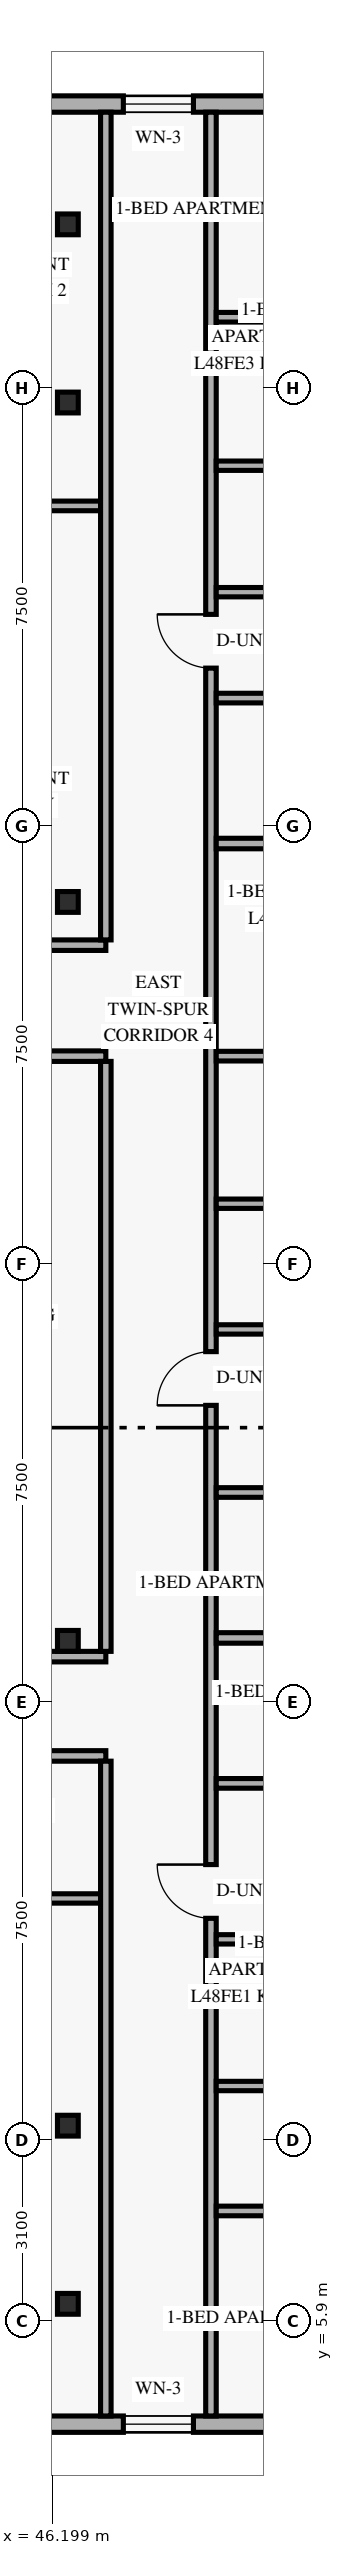
"""IFC4 building model, lengths in metres.
Left out: names, types, materials, properties, quantities, classifications, styles, units other than length and angle.
Written with IfcOpenShell. Run it as: python <this file> out.ifc"""

import sys

from ifc_helpers import new_model, si_unit, direction, frame, frame_2d, origin, origin_2d, place, context, subcontext, project, spatial, rectangle, hollow_rectangle, extrude, element, fill, save


model = new_model("IFC4")
c1 = context("Model", 3, precision=1e-05, world=origin(), true_north=direction((0.0, 1.0)))
c2 = subcontext(c1, "Body", "Model", "MODEL_VIEW")
j1 = project(units=[si_unit("LENGTHUNIT", "METRE"), si_unit("PLANEANGLEUNIT", "RADIAN")], contexts=[c1])
p1 = place(None, origin())
s1 = spatial("IfcSite", under=j1, at=p1, CompositionType="ELEMENT")
p2 = place(p1, origin())
s2 = spatial("IfcBuilding", under=s1, at=p2, CompositionType="ELEMENT")
p3 = place(p2, frame((0.0, 0.0, 184.8)))
s3 = spatial("IfcBuildingStorey", under=s2, at=p3, CompositionType="ELEMENT", Elevation=184.8)
for number, where, z_axis, x_axis in (
    (1, (46.404, 6.2, 0.0), (0.035, 0.0, 0.999), (0.0, 1.0, 0.0)),
    (2, (46.404, 9.25, 0.0), (0.035, 0.0, 0.999), (0.0, 1.0, 0.0)),
    (3, (46.404, 17.55, 0.0), (0.035, 0.0, 0.999), (0.0, 1.0, 0.0)),
    (4, (46.404, 30.2, 0.0), (0.035, 0.0, 0.999), (0.0, 1.0, 0.0)),
    (5, (46.404, 38.75, 0.0), (0.035, 0.0, 0.999), (0.0, 1.0, 0.0)),
    (6, (46.404, 41.8, 0.0), (0.035, 0.0, 0.999), (0.0, 1.0, 0.0)),
):
    element("IfcColumn", number, at=place(p3, frame(where, z_axis=z_axis, x_axis=x_axis)), inside=s3, PredefinedType="COLUMN", context=c2, shape_type="SweptSolid", body=[
        extrude(hollow_rectangle(XDim=0.356, YDim=0.356, WallThickness=0.016, at=origin_2d()), origin(), (0.0, 0.0, 1.0), 3.602),
    ])
p4 = place(p3, frame((21.22, 4.14, 0.0), z_axis=(0.0, 0.0, 1.0), x_axis=(1.0, 0.0, 0.0)))
e7 = element("IfcWall", 7, at=p4, inside=s3, PredefinedType="SOLIDWALL", context=c2, shape_type="SweptSolid", body=[
    extrude(rectangle(XDim=33.76, YDim=0.28, at=frame_2d((16.88, 0.0))), origin(), (0.0, 0.0, 1.0), 3.36),
])
p5 = place(p4, frame((2.33, 0.0, 0.85)))
e8 = element("IfcOpeningElement", 8, at=p5, cuts=e7, PredefinedType="OPENING", context=c2, shape_type="SweptSolid", body=[
    extrude(rectangle(XDim=1.65, YDim=1.6, at=frame_2d((0.825, 0.8))), frame((0.0, 0.15, 0.0), z_axis=(0.0, -1.0, 0.0), x_axis=(1.0, 0.0, 0.0)), (0.0, 0.0, 1.0), 0.3),
])
p6 = place(p4, frame((9.215, 0.0, 0.85)))
e9 = element("IfcOpeningElement", 9, at=p6, cuts=e7, PredefinedType="OPENING", context=c2, shape_type="SweptSolid", body=[
    extrude(rectangle(XDim=1.65, YDim=1.6, at=frame_2d((0.825, 0.8))), frame((0.0, 0.15, 0.0), z_axis=(0.0, -1.0, 0.0), x_axis=(1.0, 0.0, 0.0)), (0.0, 0.0, 1.0), 0.3),
])
p7 = place(p4, frame((14.64, 0.0, 0.85)))
e10 = element("IfcOpeningElement", 10, at=p7, cuts=e7, PredefinedType="OPENING", context=c2, shape_type="SweptSolid", body=[
    extrude(rectangle(XDim=1.65, YDim=1.6, at=frame_2d((0.825, 0.8))), frame((0.0, 0.15, 0.0), z_axis=(0.0, -1.0, 0.0), x_axis=(1.0, 0.0, 0.0)), (0.0, 0.0, 1.0), 0.3),
])
p8 = place(p4, frame((20.489, 0.0, 0.85)))
e11 = element("IfcOpeningElement", 11, at=p8, cuts=e7, PredefinedType="OPENING", context=c2, shape_type="SweptSolid", body=[
    extrude(rectangle(XDim=1.65, YDim=1.6, at=frame_2d((0.825, 0.8))), frame((0.0, 0.15, 0.0), z_axis=(0.0, -1.0, 0.0), x_axis=(1.0, 0.0, 0.0)), (0.0, 0.0, 1.0), 0.3),
])
p9 = place(p4, frame((26.197, 0.0, 0.85)))
e12 = element("IfcOpeningElement", 12, at=p9, cuts=e7, PredefinedType="OPENING", context=c2, shape_type="SweptSolid", body=[
    extrude(rectangle(XDim=1.2, YDim=1.5, at=frame_2d((0.6, 0.75))), frame((0.0, 0.15, 0.0), z_axis=(0.0, -1.0, 0.0), x_axis=(1.0, 0.0, 0.0)), (0.0, 0.0, 1.0), 0.3),
])
p10 = place(p4, frame((29.904, 0.0, 0.85)))
e13 = element("IfcOpeningElement", 13, at=p10, cuts=e7, PredefinedType="OPENING", context=c2, shape_type="SweptSolid", body=[
    extrude(rectangle(XDim=1.65, YDim=1.6, at=frame_2d((0.825, 0.8))), frame((0.0, 0.15, 0.0), z_axis=(0.0, -1.0, 0.0), x_axis=(1.0, 0.0, 0.0)), (0.0, 0.0, 1.0), 0.3),
])
p11 = place(p3, frame((54.98, 43.86, 0.0), z_axis=(0.0, 0.0, 1.0), x_axis=(-1.0, 0.0, 0.0)))
e14 = element("IfcWall", 14, at=p11, inside=s3, PredefinedType="SOLIDWALL", context=c2, shape_type="SweptSolid", body=[
    extrude(rectangle(XDim=33.76, YDim=0.28, at=frame_2d((16.88, 0.0))), origin(), (0.0, 0.0, 1.0), 3.36),
])
p12 = place(p11, frame((28.555, 0.0, 0.85)))
e15 = element("IfcOpeningElement", 15, at=p12, cuts=e14, PredefinedType="OPENING", context=c2, shape_type="SweptSolid", body=[
    extrude(rectangle(XDim=1.65, YDim=1.6, at=frame_2d((0.825, 0.8))), frame((0.0, 0.15, 0.0), z_axis=(0.0, -1.0, 0.0), x_axis=(1.0, 0.0, 0.0)), (0.0, 0.0, 1.0), 0.3),
])
p13 = place(p11, frame((21.67, 0.0, 0.85)))
e16 = element("IfcOpeningElement", 16, at=p13, cuts=e14, PredefinedType="OPENING", context=c2, shape_type="SweptSolid", body=[
    extrude(rectangle(XDim=1.65, YDim=1.6, at=frame_2d((0.825, 0.8))), frame((0.0, 0.15, 0.0), z_axis=(0.0, -1.0, 0.0), x_axis=(1.0, 0.0, 0.0)), (0.0, 0.0, 1.0), 0.3),
])
p14 = place(p11, frame((14.957, 0.0, 0.85)))
e17 = element("IfcOpeningElement", 17, at=p14, cuts=e14, PredefinedType="OPENING", context=c2, shape_type="SweptSolid", body=[
    extrude(rectangle(XDim=1.65, YDim=1.6, at=frame_2d((0.825, 0.8))), frame((0.0, 0.15, 0.0), z_axis=(0.0, -1.0, 0.0), x_axis=(1.0, 0.0, 0.0)), (0.0, 0.0, 1.0), 0.3),
])
p15 = place(p11, frame((9.108, 0.0, 0.85)))
e18 = element("IfcOpeningElement", 18, at=p15, cuts=e14, PredefinedType="OPENING", context=c2, shape_type="SweptSolid", body=[
    extrude(rectangle(XDim=1.65, YDim=1.6, at=frame_2d((0.825, 0.8))), frame((0.0, 0.15, 0.0), z_axis=(0.0, -1.0, 0.0), x_axis=(1.0, 0.0, 0.0)), (0.0, 0.0, 1.0), 0.3),
])
p16 = place(p11, frame((6.363, 0.0, 0.85)))
e19 = element("IfcOpeningElement", 19, at=p16, cuts=e14, PredefinedType="OPENING", context=c2, shape_type="SweptSolid", body=[
    extrude(rectangle(XDim=1.2, YDim=1.5, at=frame_2d((0.6, 0.75))), frame((0.0, 0.15, 0.0), z_axis=(0.0, -1.0, 0.0), x_axis=(1.0, 0.0, 0.0)), (0.0, 0.0, 1.0), 0.3),
])
p17 = place(p11, frame((2.207, 0.0, 0.85)))
e20 = element("IfcOpeningElement", 20, at=p17, cuts=e14, PredefinedType="OPENING", context=c2, shape_type="SweptSolid", body=[
    extrude(rectangle(XDim=1.65, YDim=1.6, at=frame_2d((0.825, 0.8))), frame((0.0, 0.15, 0.0), z_axis=(0.0, -1.0, 0.0), x_axis=(1.0, 0.0, 0.0)), (0.0, 0.0, 1.0), 0.3),
])
p18 = place(p3, frame((38.032, 15.58, 0.0), z_axis=(0.0, 0.0, 1.0), x_axis=(1.0, 0.0, 0.0)))
e21 = element("IfcWall", 21, at=p18, inside=s3, PredefinedType="STANDARD", context=c2, shape_type="SweptSolid", body=[
    extrude(rectangle(XDim=9.084, YDim=0.18, at=frame_2d((4.542, 0.0))), origin(), (0.0, 0.0, 1.0), 2.73),
])
p19 = place(p18, frame((0.357, 0.0, 0.0)))
e22 = element("IfcOpeningElement", 22, at=p19, cuts=e21, PredefinedType="OPENING", context=c2, shape_type="SweptSolid", body=[
    extrude(rectangle(XDim=0.92, YDim=2.15, at=frame_2d((0.46, 1.075))), frame((0.0, 0.1, 0.0), z_axis=(0.0, -1.0, 0.0), x_axis=(1.0, 0.0, 0.0)), (0.0, 0.0, 1.0), 0.2),
])
p20 = place(p3, frame((37.64, 17.28, 0.0), z_axis=(0.0, 0.0, 1.0), x_axis=(1.0, 0.0, 0.0)))
e23 = element("IfcWall", 23, at=p20, inside=s3, PredefinedType="STANDARD", context=c2, shape_type="SweptSolid", body=[
    extrude(rectangle(XDim=9.477, YDim=0.18, at=frame_2d((4.739, 0.0))), origin(), (0.0, 0.0, 1.0), 2.73),
])
p21 = place(p20, frame((6.625, 0.0, 0.0)))
e24 = element("IfcOpeningElement", 24, at=p21, cuts=e23, PredefinedType="OPENING", context=c2, shape_type="SweptSolid", body=[
    extrude(rectangle(XDim=0.92, YDim=2.15, at=frame_2d((0.46, 1.075))), frame((0.0, 0.1, 0.0), z_axis=(0.0, -1.0, 0.0), x_axis=(1.0, 0.0, 0.0)), (0.0, 0.0, 1.0), 0.2),
])
p22 = place(p3, frame((37.64, 27.56, 0.0), z_axis=(0.0, 0.0, 1.0), x_axis=(1.0, 0.0, 0.0)))
e25 = element("IfcWall", 25, at=p22, inside=s3, PredefinedType="STANDARD", context=c2, shape_type="SweptSolid", body=[
    extrude(rectangle(XDim=9.477, YDim=0.18, at=frame_2d((4.739, 0.0))), origin(), (0.0, 0.0, 1.0), 2.73),
])
p23 = place(p3, frame((35.51, 29.46, 0.0), z_axis=(0.0, 0.0, 1.0), x_axis=(1.0, 0.0, 0.0)))
e26 = element("IfcWall", 26, at=p23, inside=s3, PredefinedType="STANDARD", context=c2, shape_type="SweptSolid", body=[
    extrude(rectangle(XDim=11.607, YDim=0.18, at=frame_2d((5.803, 0.0))), origin(), (0.0, 0.0, 1.0), 2.73),
])
p24 = place(p23, frame((0.32, 0.0, 0.0)))
e27 = element("IfcOpeningElement", 27, at=p24, cuts=e26, PredefinedType="OPENING", context=c2, shape_type="SweptSolid", body=[
    extrude(rectangle(XDim=0.92, YDim=2.15, at=frame_2d((0.46, 1.075))), frame((0.0, 0.1, 0.0), z_axis=(0.0, -1.0, 0.0), x_axis=(1.0, 0.0, 0.0)), (0.0, 0.0, 1.0), 0.2),
])
p25 = place(p3, frame((42.447, 13.14, 0.0), z_axis=(0.0, 0.0, 1.0), x_axis=(1.0, 0.0, 0.0)))
e28 = element("IfcWall", 28, at=p25, inside=s3, PredefinedType="PLUMBINGWALL", context=c2, shape_type="SweptSolid", body=[
    extrude(rectangle(XDim=4.67, YDim=0.16, at=frame_2d((2.335, 0.0))), origin(), (0.0, 0.0, 1.0), 2.73),
])
p26 = place(p25, frame((0.35, 0.0, 0.0)))
e29 = element("IfcOpeningElement", 29, at=p26, cuts=e28, PredefinedType="OPENING", context=c2, shape_type="SweptSolid", body=[
    extrude(rectangle(XDim=0.88, YDim=2.12, at=frame_2d((0.44, 1.06))), frame((0.0, 0.09, 0.0), z_axis=(0.0, -1.0, 0.0), x_axis=(1.0, 0.0, 0.0)), (0.0, 0.0, 1.0), 0.18),
])
p27 = place(p25, frame((2.72, 0.0, 0.0)))
e30 = element("IfcOpeningElement", 30, at=p27, cuts=e28, PredefinedType="OPENING", context=c2, shape_type="SweptSolid", body=[
    extrude(rectangle(XDim=0.86, YDim=2.12, at=frame_2d((0.43, 1.06))), frame((0.0, 0.09, 0.0), z_axis=(0.0, -1.0, 0.0), x_axis=(1.0, 0.0, 0.0)), (0.0, 0.0, 1.0), 0.18),
])
p28 = place(p3, frame((43.057, 36.98, 0.0), z_axis=(0.0, 0.0, 1.0), x_axis=(1.0, 0.0, 0.0)))
e31 = element("IfcWall", 31, at=p28, inside=s3, PredefinedType="PARTITIONING", context=c2, shape_type="SweptSolid", body=[
    extrude(rectangle(XDim=3.97, YDim=0.165, at=frame_2d((1.985, 0.0))), origin(), (0.0, 0.0, 1.0), 2.73),
])
p29 = place(p3, frame((48.917, 4.28, 0.0), z_axis=(0.0, 0.0, 1.0), x_axis=(0.0, 1.0, 0.0)))
e32 = element("IfcWall", 32, at=p29, inside=s3, PredefinedType="STANDARD", context=c2, shape_type="SweptSolid", body=[
    extrude(rectangle(XDim=39.44, YDim=0.18, at=frame_2d((19.72, 0.0))), origin(), (0.0, 0.0, 1.0), 2.73),
])
p30 = place(p29, frame((8.52, 0.0, 0.0)))
e33 = element("IfcOpeningElement", 33, at=p30, cuts=e32, PredefinedType="OPENING", context=c2, shape_type="SweptSolid", body=[
    extrude(rectangle(XDim=0.92, YDim=2.15, at=frame_2d((0.46, 1.075))), frame((0.0, 0.1, 0.0), z_axis=(0.0, -1.0, 0.0), x_axis=(1.0, 0.0, 0.0)), (0.0, 0.0, 1.0), 0.2),
])
p31 = place(p29, frame((17.302, 0.0, 0.0)))
e34 = element("IfcOpeningElement", 34, at=p31, cuts=e32, PredefinedType="OPENING", context=c2, shape_type="SweptSolid", body=[
    extrude(rectangle(XDim=0.92, YDim=2.15, at=frame_2d((0.46, 1.075))), frame((0.0, 0.1, 0.0), z_axis=(0.0, -1.0, 0.0), x_axis=(1.0, 0.0, 0.0)), (0.0, 0.0, 1.0), 0.2),
])
p32 = place(p29, frame((29.923, 0.0, 0.0)))
e35 = element("IfcOpeningElement", 35, at=p32, cuts=e32, PredefinedType="OPENING", context=c2, shape_type="SweptSolid", body=[
    extrude(rectangle(XDim=0.92, YDim=2.15, at=frame_2d((0.46, 1.075))), frame((0.0, 0.1, 0.0), z_axis=(0.0, -1.0, 0.0), x_axis=(1.0, 0.0, 0.0)), (0.0, 0.0, 1.0), 0.2),
])
p33 = place(p3, frame((47.117, 4.28, 0.0), z_axis=(0.0, 0.0, 1.0), x_axis=(0.0, 1.0, 0.0)))
e36 = element("IfcWall", 36, at=p33, inside=s3, PredefinedType="STANDARD", context=c2, shape_type="SweptSolid", body=[
    extrude(rectangle(XDim=11.21, YDim=0.18, at=frame_2d((5.605, 0.0))), origin(), (0.0, 0.0, 1.0), 2.73),
])
p34 = place(p3, frame((47.117, 17.37, 0.0), z_axis=(0.0, 0.0, 1.0), x_axis=(0.0, 1.0, 0.0)))
e37 = element("IfcWall", 37, at=p34, inside=s3, PredefinedType="STANDARD", context=c2, shape_type="SweptSolid", body=[
    extrude(rectangle(XDim=10.1, YDim=0.18, at=frame_2d((5.05, 0.0))), origin(), (0.0, 0.0, 1.0), 2.73),
])
p35 = place(p3, frame((47.117, 29.55, 0.0), z_axis=(0.0, 0.0, 1.0), x_axis=(0.0, 1.0, 0.0)))
e38 = element("IfcWall", 38, at=p35, inside=s3, PredefinedType="STANDARD", context=c2, shape_type="SweptSolid", body=[
    extrude(rectangle(XDim=14.17, YDim=0.18, at=frame_2d((7.085, 0.0))), origin(), (0.0, 0.0, 1.0), 2.73),
])
p36 = place(p3, frame((49.007, 7.79, 0.0), z_axis=(0.0, 0.0, 1.0), x_axis=(1.0, 0.0, 0.0)))
e39 = element("IfcWall", 39, at=p36, inside=s3, PredefinedType="PARTITIONING", context=c2, shape_type="SweptSolid", body=[
    extrude(rectangle(XDim=9.313, YDim=0.165, at=frame_2d((4.656, 0.0))), origin(), (0.0, 0.0, 1.0), 2.879),
])
p37 = place(p36, frame((5.602, 0.0, 0.0)))
e40 = element("IfcOpeningElement", 40, at=p37, cuts=e39, PredefinedType="OPENING", context=c2, shape_type="SweptSolid", body=[
    extrude(rectangle(XDim=0.9, YDim=2.14, at=frame_2d((0.45, 1.07))), frame((0.0, 0.093, 0.0), z_axis=(0.0, -1.0, 0.0), x_axis=(1.0, 0.0, 0.0)), (0.0, 0.0, 1.0), 0.185),
])
p38 = place(p3, frame((49.007, 12.44, 0.0), z_axis=(0.0, 0.0, 1.0), x_axis=(1.0, 0.0, 0.0)))
e41 = element("IfcWall", 41, at=p38, inside=s3, PredefinedType="PLUMBINGWALL", context=c2, shape_type="SweptSolid", body=[
    extrude(rectangle(XDim=2.56, YDim=0.16, at=frame_2d((1.28, 0.0))), origin(), (0.0, 0.0, 1.0), 3.36),
])
p39 = place(p3, frame((49.007, 9.929, 0.0), z_axis=(0.0, 0.0, 1.0), x_axis=(1.0, 0.0, 0.0)))
e42 = element("IfcWall", 42, at=p39, inside=s3, PredefinedType="PLUMBINGWALL", context=c2, shape_type="SweptSolid", body=[
    extrude(rectangle(XDim=2.4, YDim=0.16, at=frame_2d((1.2, 0.0))), origin(), (0.0, 0.0, 1.0), 3.36),
])
p40 = place(p3, frame((49.007, 15.11, 0.0), z_axis=(0.0, 0.0, 1.0), x_axis=(1.0, 0.0, 0.0)))
e43 = element("IfcWall", 43, at=p40, inside=s3, PredefinedType="PARTITIONING", context=c2, shape_type="SweptSolid", body=[
    extrude(rectangle(XDim=9.313, YDim=0.165, at=frame_2d((4.656, 0.0))), origin(), (0.0, 0.0, 1.0), 2.879),
])
p41 = place(p40, frame((4.632, 0.0, 0.0)))
e44 = element("IfcOpeningElement", 44, at=p41, cuts=e43, PredefinedType="OPENING", context=c2, shape_type="SweptSolid", body=[
    extrude(rectangle(XDim=0.95, YDim=2.15, at=frame_2d((0.475, 1.075))), frame((0.0, 0.093, 0.0), z_axis=(0.0, -1.0, 0.0), x_axis=(1.0, 0.0, 0.0)), (0.0, 0.0, 1.0), 0.185),
])
p42 = place(p3, frame((49.007, 17.6, 0.0), z_axis=(0.0, 0.0, 1.0), x_axis=(1.0, 0.0, 0.0)))
e45 = element("IfcWall", 45, at=p42, inside=s3, PredefinedType="PARTITIONING", context=c2, shape_type="SweptSolid", body=[
    extrude(rectangle(XDim=9.313, YDim=0.18, at=frame_2d((4.656, 0.0))), origin(), (0.0, 0.0, 1.0), 2.73),
])
p43 = place(p3, frame((49.007, 27.56, 0.0), z_axis=(0.0, 0.0, 1.0), x_axis=(1.0, 0.0, 0.0)))
e46 = element("IfcWall", 46, at=p43, inside=s3, PredefinedType="PARTITIONING", context=c2, shape_type="SweptSolid", body=[
    extrude(rectangle(XDim=9.313, YDim=0.165, at=frame_2d((4.656, 0.0))), origin(), (0.0, 0.0, 1.0), 2.879),
])
p44 = place(p43, frame((3.008, 0.0, 0.0)))
e47 = element("IfcOpeningElement", 47, at=p44, cuts=e46, PredefinedType="OPENING", context=c2, shape_type="SweptSolid", body=[
    extrude(rectangle(XDim=0.88, YDim=2.12, at=frame_2d((0.44, 1.06))), frame((0.0, 0.093, 0.0), z_axis=(0.0, -1.0, 0.0), x_axis=(1.0, 0.0, 0.0)), (0.0, 0.0, 1.0), 0.185),
])
p45 = place(p43, frame((6.441, 0.0, 0.0)))
e48 = element("IfcOpeningElement", 48, at=p45, cuts=e46, PredefinedType="OPENING", context=c2, shape_type="SweptSolid", body=[
    extrude(rectangle(XDim=0.9, YDim=2.14, at=frame_2d((0.45, 1.07))), frame((0.0, 0.093, 0.0), z_axis=(0.0, -1.0, 0.0), x_axis=(1.0, 0.0, 0.0)), (0.0, 0.0, 1.0), 0.185),
])
p46 = place(p3, frame((49.007, 22.882, 0.0), z_axis=(0.0, 0.0, 1.0), x_axis=(1.0, 0.0, 0.0)))
e49 = element("IfcWall", 49, at=p46, inside=s3, PredefinedType="PLUMBINGWALL", context=c2, shape_type="SweptSolid", body=[
    extrude(rectangle(XDim=2.636, YDim=0.16, at=frame_2d((1.318, 0.0))), origin(), (0.0, 0.0, 1.0), 3.36),
])
p47 = place(p3, frame((49.007, 25.034, 0.0), z_axis=(0.0, 0.0, 1.0), x_axis=(1.0, 0.0, 0.0)))
e50 = element("IfcWall", 50, at=p47, inside=s3, PredefinedType="PLUMBINGWALL", context=c2, shape_type="SweptSolid", body=[
    extrude(rectangle(XDim=2.476, YDim=0.16, at=frame_2d((1.238, 0.0))), origin(), (0.0, 0.0, 1.0), 3.36),
])
p48 = place(p3, frame((49.007, 20.09, 0.0), z_axis=(0.0, 0.0, 1.0), x_axis=(1.0, 0.0, 0.0)))
e51 = element("IfcWall", 51, at=p48, inside=s3, PredefinedType="PARTITIONING", context=c2, shape_type="SweptSolid", body=[
    extrude(rectangle(XDim=9.313, YDim=0.165, at=frame_2d((4.656, 0.0))), origin(), (0.0, 0.0, 1.0), 2.879),
])
p49 = place(p48, frame((4.632, 0.0, 0.0)))
e52 = element("IfcOpeningElement", 52, at=p49, cuts=e51, PredefinedType="OPENING", context=c2, shape_type="SweptSolid", body=[
    extrude(rectangle(XDim=0.95, YDim=2.15, at=frame_2d((0.475, 1.075))), frame((0.0, 0.093, 0.0), z_axis=(0.0, -1.0, 0.0), x_axis=(1.0, 0.0, 0.0)), (0.0, 0.0, 1.0), 0.185),
])
p50 = place(p3, frame((49.007, 31.2, 0.0), z_axis=(0.0, 0.0, 1.0), x_axis=(1.0, 0.0, 0.0)))
e53 = element("IfcWall", 53, at=p50, inside=s3, PredefinedType="PARTITIONING", context=c2, shape_type="SweptSolid", body=[
    extrude(rectangle(XDim=9.313, YDim=0.18, at=frame_2d((4.656, 0.0))), origin(), (0.0, 0.0, 1.0), 2.879),
])
p51 = place(p3, frame((49.007, 40.21, 0.0), z_axis=(0.0, 0.0, 1.0), x_axis=(1.0, 0.0, 0.0)))
e54 = element("IfcWall", 54, at=p51, inside=s3, PredefinedType="PARTITIONING", context=c2, shape_type="SweptSolid", body=[
    extrude(rectangle(XDim=9.313, YDim=0.165, at=frame_2d((4.656, 0.0))), origin(), (0.0, 0.0, 1.0), 2.879),
])
p52 = place(p51, frame((5.677, 0.0, 0.0)))
e55 = element("IfcOpeningElement", 55, at=p52, cuts=e54, PredefinedType="OPENING", context=c2, shape_type="SweptSolid", body=[
    extrude(rectangle(XDim=0.9, YDim=2.14, at=frame_2d((0.45, 1.07))), frame((0.0, 0.093, 0.0), z_axis=(0.0, -1.0, 0.0), x_axis=(1.0, 0.0, 0.0)), (0.0, 0.0, 1.0), 0.185),
])
p53 = place(p3, frame((49.007, 35.503, 0.0), z_axis=(0.0, 0.0, 1.0), x_axis=(1.0, 0.0, 0.0)))
e56 = element("IfcWall", 56, at=p53, inside=s3, PredefinedType="PLUMBINGWALL", context=c2, shape_type="SweptSolid", body=[
    extrude(rectangle(XDim=2.712, YDim=0.16, at=frame_2d((1.356, 0.0))), origin(), (0.0, 0.0, 1.0), 3.36),
])
p54 = place(p3, frame((49.007, 37.668, 0.0), z_axis=(0.0, 0.0, 1.0), x_axis=(1.0, 0.0, 0.0)))
e57 = element("IfcWall", 57, at=p54, inside=s3, PredefinedType="PLUMBINGWALL", context=c2, shape_type="SweptSolid", body=[
    extrude(rectangle(XDim=2.552, YDim=0.16, at=frame_2d((1.276, 0.0))), origin(), (0.0, 0.0, 1.0), 3.36),
])
p55 = place(p3, frame((49.007, 33.69, 0.0), z_axis=(0.0, 0.0, 1.0), x_axis=(1.0, 0.0, 0.0)))
e58 = element("IfcWall", 58, at=p55, inside=s3, PredefinedType="PARTITIONING", context=c2, shape_type="SweptSolid", body=[
    extrude(rectangle(XDim=9.313, YDim=0.165, at=frame_2d((4.656, 0.0))), origin(), (0.0, 0.0, 1.0), 2.879),
])
p56 = place(p55, frame((4.632, 0.0, 0.0)))
e59 = element("IfcOpeningElement", 59, at=p56, cuts=e58, PredefinedType="OPENING", context=c2, shape_type="SweptSolid", body=[
    extrude(rectangle(XDim=0.95, YDim=2.15, at=frame_2d((0.475, 1.075))), frame((0.0, 0.093, 0.0), z_axis=(0.0, -1.0, 0.0), x_axis=(1.0, 0.0, 0.0)), (0.0, 0.0, 1.0), 0.185),
])
p57 = place(p9, origin())
e60 = element("IfcWindow", 60, at=p57, inside=s3, PartitioningType="SINGLE_PANEL", PredefinedType="WINDOW", context=c2, shape_type="SweptSolid", body=[
    extrude(rectangle(XDim=1.2, YDim=1.5, at=frame_2d((0.6, 0.75))), frame((0.0, 0.03, 0.0), z_axis=(0.0, -1.0, 0.0), x_axis=(1.0, 0.0, 0.0)), (0.0, 0.0, 1.0), 0.06),
])
fill(e12, e60)
p58 = place(p16, origin())
e61 = element("IfcWindow", 61, at=p58, inside=s3, PartitioningType="SINGLE_PANEL", PredefinedType="WINDOW", context=c2, shape_type="SweptSolid", body=[
    extrude(rectangle(XDim=1.2, YDim=1.5, at=frame_2d((0.6, 0.75))), frame((0.0, 0.03, 0.0), z_axis=(0.0, -1.0, 0.0), x_axis=(1.0, 0.0, 0.0)), (0.0, 0.0, 1.0), 0.06),
])
fill(e19, e61)
p59 = place(p30, origin())
e62 = element("IfcDoor", 62, at=p59, inside=s3, OperationType="SINGLE_SWING_RIGHT", PredefinedType="DOOR", context=c2, shape_type="SweptSolid", body=[
    extrude(rectangle(XDim=0.92, YDim=2.15, at=frame_2d((0.46, 1.075))), frame((0.0, 0.025, 0.0), z_axis=(0.0, -1.0, 0.0), x_axis=(1.0, 0.0, 0.0)), (0.0, 0.0, 1.0), 0.05),
])
fill(e33, e62)
p60 = place(p31, origin())
e63 = element("IfcDoor", 63, at=p60, inside=s3, OperationType="SINGLE_SWING_LEFT", PredefinedType="DOOR", context=c2, shape_type="SweptSolid", body=[
    extrude(rectangle(XDim=0.92, YDim=2.15, at=frame_2d((0.46, 1.075))), frame((0.0, 0.025, 0.0), z_axis=(0.0, -1.0, 0.0), x_axis=(1.0, 0.0, 0.0)), (0.0, 0.0, 1.0), 0.05),
])
fill(e34, e63)
p61 = place(p32, origin())
e64 = element("IfcDoor", 64, at=p61, inside=s3, OperationType="SINGLE_SWING_RIGHT", PredefinedType="DOOR", context=c2, shape_type="SweptSolid", body=[
    extrude(rectangle(XDim=0.92, YDim=2.15, at=frame_2d((0.46, 1.075))), frame((0.0, 0.025, 0.0), z_axis=(0.0, -1.0, 0.0), x_axis=(1.0, 0.0, 0.0)), (0.0, 0.0, 1.0), 0.05),
])
fill(e35, e64)
save(model, sys.argv[1])
